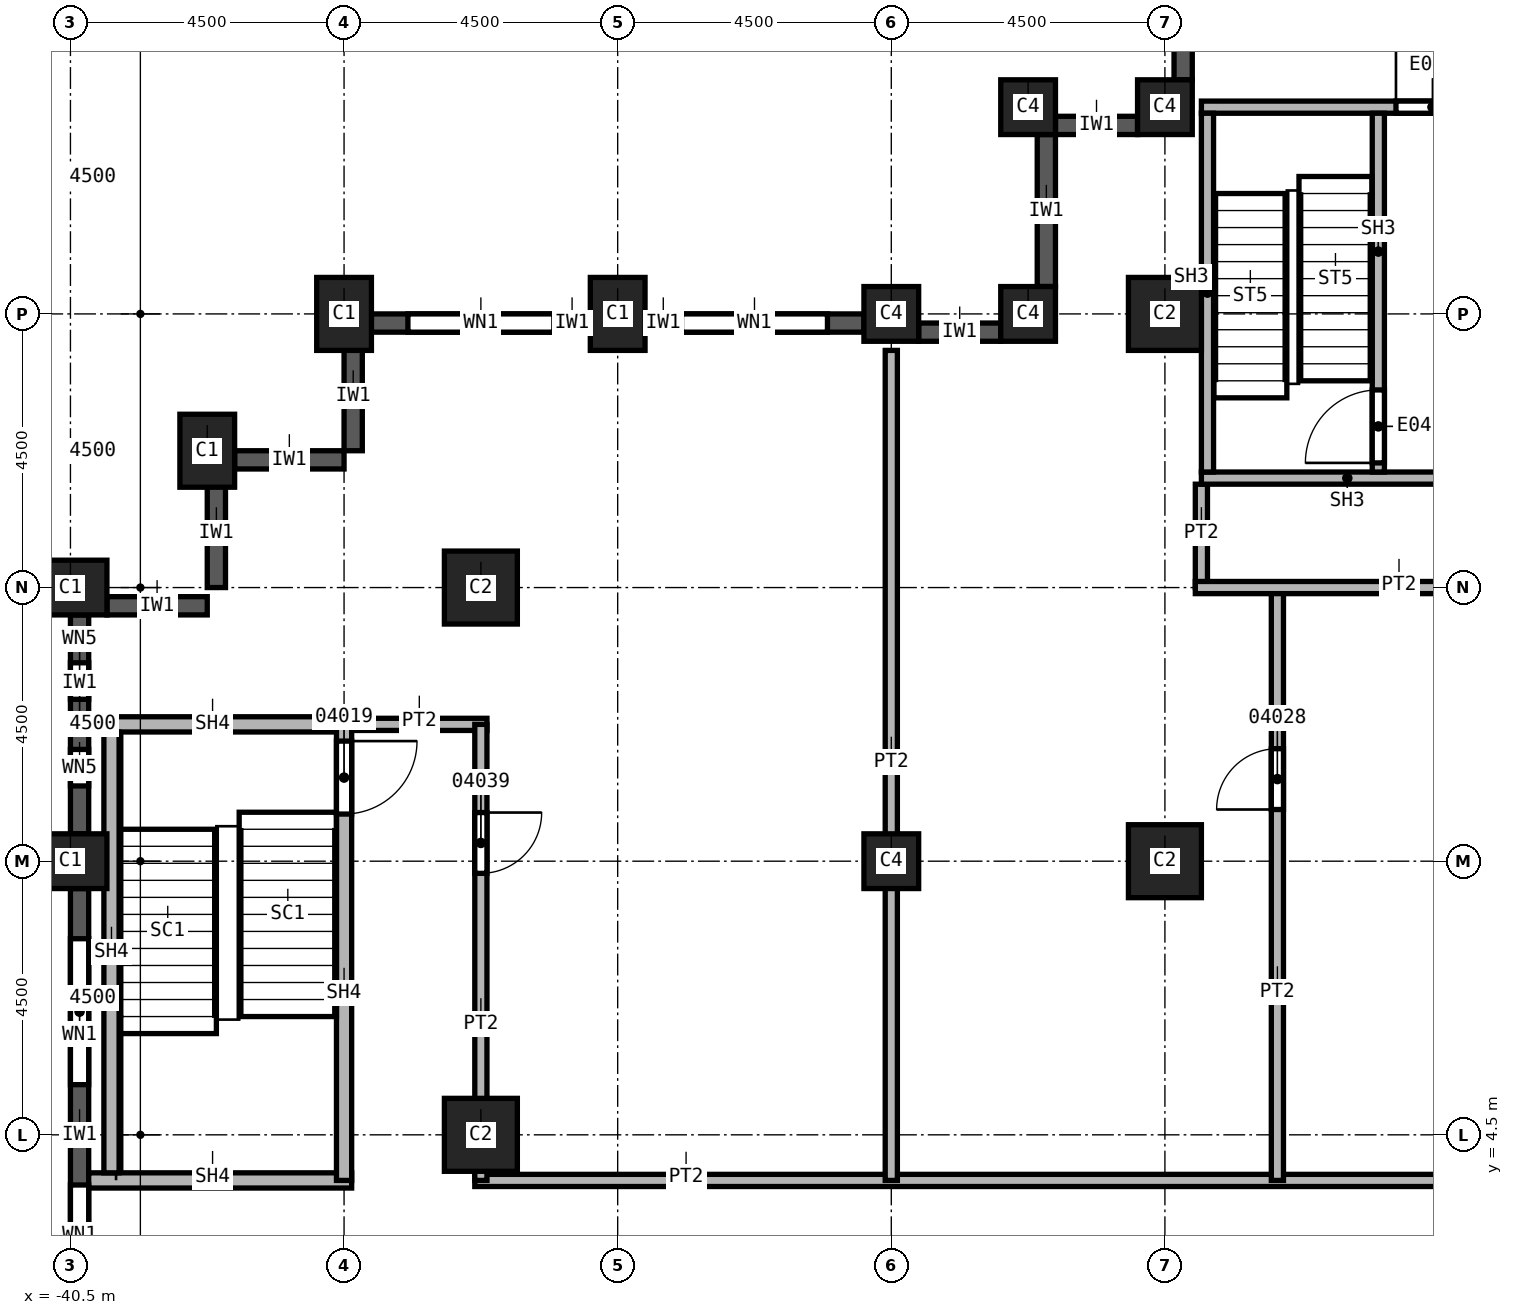
"""IFC4 building model, lengths in metres.
Left out: names, types, materials, properties, quantities, classifications, styles, units other than length and angle.
Written with IfcOpenShell. Run it as: python <this file> out.ifc"""

import sys

from ifc_helpers import new_model, si_unit, direction, frame, frame_2d, origin, origin_2d, place, context, subcontext, project, spatial, rectangle, extrude, element, fill, save


model = new_model("IFC4")
c1 = context("Model", 3, precision=1e-05, world=origin(), true_north=direction((0.0, 1.0)))
c2 = subcontext(c1, "Body", "Model", "MODEL_VIEW")
j1 = project(units=[si_unit("LENGTHUNIT", "METRE"), si_unit("PLANEANGLEUNIT", "RADIAN")], contexts=[c1])
p1 = place(None, origin())
s1 = spatial("IfcSite", under=j1, at=p1, CompositionType="ELEMENT")
p2 = place(p1, origin())
s2 = spatial("IfcBuilding", under=s1, at=p2, CompositionType="ELEMENT")
p3 = place(p2, frame((0.0, 0.0, 108.0)))
s3 = spatial("IfcBuildingStorey", under=s2, at=p3, CompositionType="ELEMENT", Elevation=108.0)
for number, where, z_axis, x_axis in (
    (1, (-40.5, 9.0, 0.0), (0.0, 0.0, 1.0), (0.0, 1.0, 0.0)),
    (2, (-40.5, 13.5, 0.0), (0.0, 0.0, 1.0), (0.0, 1.0, 0.0)),
    (3, (-38.25, 15.75, 0.0), (0.0, 0.0, 1.0), (1.0, 0.0, 0.0)),
    (4, (-31.5, 18.0, 0.0), (0.0, 0.0, 1.0), (1.0, 0.0, 0.0)),
    (5, (-36.0, 18.0, 0.0), (0.0, 0.0, 1.0), (1.0, 0.0, 0.0)),
):
    element("IfcColumn", number, at=place(p3, frame(where, z_axis=z_axis, x_axis=x_axis)), inside=s3, PredefinedType="COLUMN", context=c2, shape_type="SweptSolid", body=[
        extrude(rectangle(XDim=0.9, YDim=1.2, at=origin_2d()), origin(), (0.0, 0.0, 1.0), 3.7),
    ])
for number, where, z_axis, x_axis in (
    (6, (-33.75, 4.5, 0.0), (0.0, 0.0, 1.0), (1.0, 0.0, 0.0)),
    (7, (-33.75, 13.5, 0.0), (0.0, 0.0, 1.0), (1.0, 0.0, 0.0)),
    (8, (-22.5, 9.0, 0.0), (0.0, 0.0, 1.0), (1.0, 0.0, 0.0)),
    (9, (-22.5, 18.0, 0.0), (0.0, 0.0, 1.0), (1.0, 0.0, 0.0)),
):
    element("IfcColumn", number, at=place(p3, frame(where, z_axis=z_axis, x_axis=x_axis)), inside=s3, PredefinedType="COLUMN", context=c2, shape_type="SweptSolid", body=[
        extrude(rectangle(XDim=1.2, YDim=1.2, at=origin_2d()), origin(), (0.0, 0.0, 1.0), 3.7),
    ])
for number, where, z_axis, x_axis in (
    (10, (-27.0, 9.0, 0.0), (0.0, 0.0, 1.0), (1.0, 0.0, 0.0)),
    (11, (-27.0, 18.0, 0.0), (0.0, 0.0, 1.0), (1.0, 0.0, 0.0)),
    (12, (-22.5, 21.4, 0.0), (0.0, 0.0, 1.0), (1.0, 0.0, 0.0)),
    (13, (-24.75, 21.4, 0.0), (0.0, 0.0, 1.0), (1.0, 0.0, 0.0)),
    (14, (-24.75, 18.0, 0.0), (0.0, 0.0, 1.0), (1.0, 0.0, 0.0)),
):
    element("IfcColumn", number, at=place(p3, frame(where, z_axis=z_axis, x_axis=x_axis)), inside=s3, PredefinedType="COLUMN", context=c2, shape_type="SweptSolid", body=[
        extrude(rectangle(XDim=0.9, YDim=0.9, at=origin_2d()), origin(), (0.0, 0.0, 1.0), 3.7),
    ])
for number, where, z_axis, x_axis in (
    (15, (-35.85, 17.55, 0.0), (0.0, 0.0, 1.0), (0.0, -1.0, 0.0)),
    (16, (-37.8, 15.6, 0.0), (0.0, 0.0, 1.0), (1.0, 0.0, 0.0)),
    (17, (-38.1, 15.3, 0.0), (0.0, 0.0, 1.0), (0.0, -1.0, 0.0)),
):
    element("IfcWall", number, at=place(p3, frame(where, z_axis=z_axis, x_axis=x_axis)), inside=s3, PredefinedType="SOLIDWALL", context=c2, shape_type="SweptSolid", body=[
        extrude(rectangle(XDim=1.8, YDim=0.3, at=frame_2d((0.9, 0.0))), origin(), (0.0, 0.0, 1.0), 3.1),
    ])
p4 = place(p3, frame((-39.9, 13.2, 0.0), z_axis=(0.0, 0.0, 1.0), x_axis=(1.0, 0.0, 0.0)))
e18 = element("IfcWall", 18, at=p4, inside=s3, PredefinedType="SOLIDWALL", context=c2, shape_type="SweptSolid", body=[
    extrude(rectangle(XDim=1.65, YDim=0.3, at=frame_2d((0.825, 0.0))), origin(), (0.0, 0.0, 1.0), 3.1),
])
p5 = place(p3, frame((-22.2, 24.2, 0.0), z_axis=(0.0, 0.0, 1.0), x_axis=(0.0, -1.0, 0.0)))
e19 = element("IfcWall", 19, at=p5, inside=s3, PredefinedType="SOLIDWALL", context=c2, shape_type="SweptSolid", body=[
    extrude(rectangle(XDim=2.35, YDim=0.3, at=frame_2d((1.175, 0.0))), origin(), (0.0, 0.0, 1.0), 3.1),
])
p6 = place(p3, frame((-22.95, 21.1, 0.0), z_axis=(0.0, 0.0, 1.0), x_axis=(-1.0, 0.0, 0.0)))
e20 = element("IfcWall", 20, at=p6, inside=s3, PredefinedType="SOLIDWALL", context=c2, shape_type="SweptSolid", body=[
    extrude(rectangle(XDim=1.35, YDim=0.3, at=frame_2d((0.675, 0.0))), origin(), (0.0, 0.0, 1.0), 3.1),
])
p7 = place(p3, frame((-24.45, 20.95, 0.0), z_axis=(0.0, 0.0, 1.0), x_axis=(0.0, -1.0, 0.0)))
e21 = element("IfcWall", 21, at=p7, inside=s3, PredefinedType="SOLIDWALL", context=c2, shape_type="SweptSolid", body=[
    extrude(rectangle(XDim=2.5, YDim=0.3, at=frame_2d((1.25, 0.0))), origin(), (0.0, 0.0, 1.0), 3.1),
])
p8 = place(p3, frame((-25.2, 17.7, 0.0), z_axis=(0.0, 0.0, 1.0), x_axis=(-1.0, 0.0, 0.0)))
e22 = element("IfcWall", 22, at=p8, inside=s3, PredefinedType="SOLIDWALL", context=c2, shape_type="SweptSolid", body=[
    extrude(rectangle(XDim=1.35, YDim=0.3, at=frame_2d((0.675, 0.0))), origin(), (0.0, 0.0, 1.0), 3.1),
])
p9 = place(p3, frame((-27.45, 17.85, 0.0), z_axis=(0.0, 0.0, 1.0), x_axis=(-1.0, 0.0, 0.0)))
e23 = element("IfcWall", 23, at=p9, inside=s3, PredefinedType="SOLIDWALL", context=c2, shape_type="SweptSolid", body=[
    extrude(rectangle(XDim=3.6, YDim=0.3, at=frame_2d((1.8, 0.0))), origin(), (0.0, 0.0, 1.0), 3.1),
])
p10 = place(p9, frame((0.6, 0.0, 0.8)))
e24 = element("IfcOpeningElement", 24, at=p10, cuts=e23, PredefinedType="OPENING", context=c2, shape_type="SweptSolid", body=[
    extrude(rectangle(XDim=2.4, YDim=1.95, at=frame_2d((1.2, 0.975))), frame((0.0, 0.15, 0.0), z_axis=(0.0, -1.0, 0.0), x_axis=(1.0, 0.0, 0.0)), (0.0, 0.0, 1.0), 0.3),
])
p11 = place(p3, frame((-31.95, 17.85, 0.0), z_axis=(0.0, 0.0, 1.0), x_axis=(-1.0, 0.0, 0.0)))
e25 = element("IfcWall", 25, at=p11, inside=s3, PredefinedType="SOLIDWALL", context=c2, shape_type="SweptSolid", body=[
    extrude(rectangle(XDim=3.6, YDim=0.3, at=frame_2d((1.8, 0.0))), origin(), (0.0, 0.0, 1.0), 3.1),
])
p12 = place(p11, frame((0.6, 0.0, 0.8)))
e26 = element("IfcOpeningElement", 26, at=p12, cuts=e25, PredefinedType="OPENING", context=c2, shape_type="SweptSolid", body=[
    extrude(rectangle(XDim=2.4, YDim=1.95, at=frame_2d((1.2, 0.975))), frame((0.0, 0.15, 0.0), z_axis=(0.0, -1.0, 0.0), x_axis=(1.0, 0.0, 0.0)), (0.0, 0.0, 1.0), 0.3),
])
p13 = place(p3, frame((-40.35, 13.05, 0.0), z_axis=(0.0, 0.0, 1.0), x_axis=(0.0, -1.0, 0.0)))
e27 = element("IfcWall", 27, at=p13, inside=s3, PredefinedType="SOLIDWALL", context=c2, shape_type="SweptSolid", body=[
    extrude(rectangle(XDim=3.6, YDim=0.3, at=frame_2d((1.8, 0.0))), origin(), (0.0, 0.0, 1.0), 3.1),
])
p14 = place(p13, frame((0.788, 0.0, 0.8)))
e28 = element("IfcOpeningElement", 28, at=p14, cuts=e27, PredefinedType="OPENING", context=c2, shape_type="SweptSolid", body=[
    extrude(rectangle(XDim=0.6, YDim=1.95, at=frame_2d((0.3, 0.975))), frame((0.0, 0.15, 0.0), z_axis=(0.0, -1.0, 0.0), x_axis=(1.0, 0.0, 0.0)), (0.0, 0.0, 1.0), 0.3),
])
p15 = place(p13, frame((2.212, 0.0, 0.8)))
e29 = element("IfcOpeningElement", 29, at=p15, cuts=e27, PredefinedType="OPENING", context=c2, shape_type="SweptSolid", body=[
    extrude(rectangle(XDim=0.6, YDim=1.95, at=frame_2d((0.3, 0.975))), frame((0.0, 0.15, 0.0), z_axis=(0.0, -1.0, 0.0), x_axis=(1.0, 0.0, 0.0)), (0.0, 0.0, 1.0), 0.3),
])
p16 = place(p3, frame((-40.35, 8.55, 0.0), z_axis=(0.0, 0.0, 1.0), x_axis=(0.0, -1.0, 0.0)))
e30 = element("IfcWall", 30, at=p16, inside=s3, PredefinedType="SOLIDWALL", context=c2, shape_type="SweptSolid", body=[
    extrude(rectangle(XDim=8.1, YDim=0.3, at=frame_2d((4.05, 0.0))), origin(), (0.0, 0.0, 1.0), 3.1),
])
p17 = place(p16, frame((0.825, 0.0, 0.8)))
e31 = element("IfcOpeningElement", 31, at=p17, cuts=e30, PredefinedType="OPENING", context=c2, shape_type="SweptSolid", body=[
    extrude(rectangle(XDim=2.4, YDim=1.95, at=frame_2d((1.2, 0.975))), frame((0.0, 0.15, 0.0), z_axis=(0.0, -1.0, 0.0), x_axis=(1.0, 0.0, 0.0)), (0.0, 0.0, 1.0), 0.3),
])
p18 = place(p16, frame((4.875, 0.0, 0.8)))
e32 = element("IfcOpeningElement", 32, at=p18, cuts=e30, PredefinedType="OPENING", context=c2, shape_type="SweptSolid", body=[
    extrude(rectangle(XDim=2.4, YDim=1.95, at=frame_2d((1.2, 0.975))), frame((0.0, 0.15, 0.0), z_axis=(0.0, -1.0, 0.0), x_axis=(1.0, 0.0, 0.0)), (0.0, 0.0, 1.0), 0.3),
])
p19 = place(p3, frame((-36.0, 11.25, 0.0), z_axis=(0.0, 0.0, 1.0), x_axis=(1.0, 0.0, 0.0)))
e33 = element("IfcWall", 33, at=p19, inside=s3, PredefinedType="PARTITIONING", context=c2, shape_type="SweptSolid", body=[
    extrude(rectangle(XDim=2.35, YDim=0.2, at=frame_2d((1.175, 0.0))), origin(), (0.0, 0.0, 1.0), 3.7),
])
p20 = place(p3, frame((-33.85, 3.75, 0.0), z_axis=(0.0, 0.0, 1.0), x_axis=(1.0, 0.0, 0.0)))
e34 = element("IfcWall", 34, at=p20, inside=s3, PredefinedType="PARTITIONING", context=c2, shape_type="SweptSolid", body=[
    extrude(rectangle(XDim=18.45, YDim=0.2, at=frame_2d((9.225, 0.0))), origin(), (0.0, 0.0, 1.0), 3.7),
])
p21 = place(p3, frame((-33.75, 11.25, 0.0), z_axis=(0.0, 0.0, 1.0), x_axis=(0.0, -1.0, 0.0)))
e35 = element("IfcWall", 35, at=p21, inside=s3, PredefinedType="PARTITIONING", context=c2, shape_type="SweptSolid", body=[
    extrude(rectangle(XDim=7.5, YDim=0.2, at=frame_2d((3.75, 0.0))), origin(), (0.0, 0.0, 1.0), 3.7),
])
p22 = place(p21, frame((1.45, 0.0, 0.0)))
e36 = element("IfcOpeningElement", 36, at=p22, cuts=e35, PredefinedType="OPENING", context=c2, shape_type="SweptSolid", body=[
    extrude(rectangle(XDim=1.0, YDim=2.1, at=frame_2d((0.5, 1.05))), frame((0.0, 0.1, 0.0), z_axis=(0.0, -1.0, 0.0), x_axis=(1.0, 0.0, 0.0)), (0.0, 0.0, 1.0), 0.2),
])
p23 = place(p3, frame((-27.0, 3.75, 0.0), z_axis=(0.0, 0.0, 1.0), x_axis=(0.0, 1.0, 0.0)))
e37 = element("IfcWall", 37, at=p23, inside=s3, PredefinedType="PARTITIONING", context=c2, shape_type="SweptSolid", body=[
    extrude(rectangle(XDim=13.65, YDim=0.2, at=frame_2d((6.825, 0.0))), origin(), (0.0, 0.0, 1.0), 3.7),
])
p24 = place(p3, frame((-21.9, 13.5, 0.0), z_axis=(0.0, 0.0, 1.0), x_axis=(0.0, 1.0, 0.0)))
e38 = element("IfcWall", 38, at=p24, inside=s3, PredefinedType="PARTITIONING", context=c2, shape_type="SweptSolid", body=[
    extrude(rectangle(XDim=1.7, YDim=0.2, at=frame_2d((0.85, 0.0))), origin(), (0.0, 0.0, 1.0), 3.7),
])
p25 = place(p3, frame((-20.65, 3.75, 0.0), z_axis=(0.0, 0.0, 1.0), x_axis=(0.0, 1.0, 0.0)))
e39 = element("IfcWall", 39, at=p25, inside=s3, PredefinedType="PARTITIONING", context=c2, shape_type="SweptSolid", body=[
    extrude(rectangle(XDim=9.75, YDim=0.2, at=frame_2d((4.875, 0.0))), origin(), (0.0, 0.0, 1.0), 3.7),
])
p26 = place(p25, frame((6.1, 0.0, 0.0)))
e40 = element("IfcOpeningElement", 40, at=p26, cuts=e39, PredefinedType="OPENING", context=c2, shape_type="SweptSolid", body=[
    extrude(rectangle(XDim=1.0, YDim=2.1, at=frame_2d((0.5, 1.05))), frame((0.0, 0.1, 0.0), z_axis=(0.0, -1.0, 0.0), x_axis=(1.0, 0.0, 0.0)), (0.0, 0.0, 1.0), 0.2),
])
p27 = place(p3, frame((-15.4, 13.5, 0.0), z_axis=(0.0, 0.0, 1.0), x_axis=(-1.0, 0.0, 0.0)))
e41 = element("IfcWall", 41, at=p27, inside=s3, PredefinedType="PARTITIONING", context=c2, shape_type="SweptSolid", body=[
    extrude(rectangle(XDim=6.6, YDim=0.2, at=frame_2d((3.3, 0.0))), origin(), (0.0, 0.0, 1.0), 3.7),
])
p28 = place(p3, frame((-40.2, 3.75, 0.0), z_axis=(0.0, 0.0, 1.0), x_axis=(1.0, 0.0, 0.0)))
e42 = element("IfcWall", 42, at=p28, inside=s3, PredefinedType="SOLIDWALL", context=c2, shape_type="SweptSolid", body=[
    extrude(rectangle(XDim=4.325, YDim=0.25, at=frame_2d((2.163, 0.0))), origin(), (0.0, 0.0, 1.0), 3.7),
])
p29 = place(p3, frame((-40.2, 11.25, 0.0), z_axis=(0.0, 0.0, 1.0), x_axis=(1.0, 0.0, 0.0)))
e43 = element("IfcWall", 43, at=p29, inside=s3, PredefinedType="SOLIDWALL", context=c2, shape_type="SweptSolid", body=[
    extrude(rectangle(XDim=4.2, YDim=0.25, at=frame_2d((2.1, 0.0))), origin(), (0.0, 0.0, 1.0), 3.7),
])
p30 = place(p3, frame((-36.0, 11.375, 0.0), z_axis=(0.0, 0.0, 1.0), x_axis=(0.0, -1.0, 0.0)))
e44 = element("IfcWall", 44, at=p30, inside=s3, PredefinedType="SOLIDWALL", context=c2, shape_type="SweptSolid", body=[
    extrude(rectangle(XDim=7.625, YDim=0.25, at=frame_2d((3.812, 0.0))), origin(), (0.0, 0.0, 1.0), 3.7),
])
p31 = place(p30, frame((0.4, 0.0, 0.0)))
e45 = element("IfcOpeningElement", 45, at=p31, cuts=e44, PredefinedType="OPENING", context=c2, shape_type="SweptSolid", body=[
    extrude(rectangle(XDim=1.2, YDim=2.1, at=frame_2d((0.6, 1.05))), frame((0.0, 0.125, 0.0), z_axis=(0.0, -1.0, 0.0), x_axis=(1.0, 0.0, 0.0)), (0.0, 0.0, 1.0), 0.25),
])
p32 = place(p3, frame((-21.9, 15.3, 0.0), z_axis=(0.0, 0.0, 1.0), x_axis=(1.0, 0.0, 0.0)))
e46 = element("IfcWall", 46, at=p32, inside=s3, PredefinedType="SOLIDWALL", context=c2, shape_type="SweptSolid", body=[
    extrude(rectangle(XDim=8.275, YDim=0.2, at=frame_2d((4.137, 0.0))), origin(), (0.0, 0.0, 1.0), 3.7),
])
p33 = place(p32, frame((4.8, 0.0, 0.0)))
e47 = element("IfcOpeningElement", 47, at=p33, cuts=e46, PredefinedType="OPENING", context=c2, shape_type="SweptSolid", body=[
    extrude(rectangle(XDim=1.2, YDim=2.1, at=frame_2d((0.6, 1.05))), frame((0.0, 0.1, 0.0), z_axis=(0.0, -1.0, 0.0), x_axis=(1.0, 0.0, 0.0)), (0.0, 0.0, 1.0), 0.2),
])
p34 = place(p3, frame((-21.9, 21.4, 0.0), z_axis=(0.0, 0.0, 1.0), x_axis=(1.0, 0.0, 0.0)))
e48 = element("IfcWall", 48, at=p34, inside=s3, PredefinedType="SOLIDWALL", context=c2, shape_type="SweptSolid", body=[
    extrude(rectangle(XDim=7.8, YDim=0.2, at=frame_2d((3.9, 0.0))), origin(), (0.0, 0.0, 1.0), 3.7),
])
p35 = place(p34, frame((3.2, 0.0, 0.0)))
e49 = element("IfcOpeningElement", 49, at=p35, cuts=e48, PredefinedType="OPENING", context=c2, shape_type="SweptSolid", body=[
    extrude(rectangle(XDim=1.2, YDim=2.1, at=frame_2d((0.6, 1.05))), frame((0.0, 0.1, 0.0), z_axis=(0.0, -1.0, 0.0), x_axis=(1.0, 0.0, 0.0)), (0.0, 0.0, 1.0), 0.2),
])
p36 = place(p3, frame((-21.8, 15.4, 0.0), z_axis=(0.0, 0.0, 1.0), x_axis=(0.0, 1.0, 0.0)))
e50 = element("IfcWall", 50, at=p36, inside=s3, PredefinedType="SOLIDWALL", context=c2, shape_type="SweptSolid", body=[
    extrude(rectangle(XDim=5.9, YDim=0.2, at=frame_2d((2.95, 0.0))), origin(), (0.0, 0.0, 1.0), 3.7),
])
p37 = place(p3, frame((-18.99, 15.4, 0.0), z_axis=(0.0, 0.0, 1.0), x_axis=(0.0, 1.0, 0.0)))
e51 = element("IfcWall", 51, at=p37, inside=s3, PredefinedType="SOLIDWALL", context=c2, shape_type="SweptSolid", body=[
    extrude(rectangle(XDim=5.9, YDim=0.2, at=frame_2d((2.95, 0.0))), origin(), (0.0, 0.0, 1.0), 3.7),
])
p38 = place(p37, frame((0.15, 0.0, 0.0)))
e52 = element("IfcOpeningElement", 52, at=p38, cuts=e51, PredefinedType="OPENING", context=c2, shape_type="SweptSolid", body=[
    extrude(rectangle(XDim=1.2, YDim=2.1, at=frame_2d((0.6, 1.05))), frame((0.0, 0.1, 0.0), z_axis=(0.0, -1.0, 0.0), x_axis=(1.0, 0.0, 0.0)), (0.0, 0.0, 1.0), 0.2),
])
p39 = place(p3, frame((-39.825, 3.875, 0.0), z_axis=(0.0, 0.0, 1.0), x_axis=(0.0, 1.0, 0.0)))
e53 = element("IfcWall", 53, at=p39, inside=s3, PredefinedType="SOLIDWALL", context=c2, shape_type="SweptSolid", body=[
    extrude(rectangle(XDim=7.25, YDim=0.25, at=frame_2d((3.625, 0.0))), origin(), (0.0, 0.0, 1.0), 3.7),
])
p40 = place(p10, origin())
e54 = element("IfcWindow", 54, at=p40, inside=s3, PartitioningType="SINGLE_PANEL", PredefinedType="WINDOW", context=c2, shape_type="SweptSolid", body=[
    extrude(rectangle(XDim=2.4, YDim=1.95, at=frame_2d((1.2, 0.975))), frame((0.0, 0.03, 0.0), z_axis=(0.0, -1.0, 0.0), x_axis=(1.0, 0.0, 0.0)), (0.0, 0.0, 1.0), 0.06),
])
fill(e24, e54)
p41 = place(p12, origin())
e55 = element("IfcWindow", 55, at=p41, inside=s3, PartitioningType="SINGLE_PANEL", PredefinedType="WINDOW", context=c2, shape_type="SweptSolid", body=[
    extrude(rectangle(XDim=2.4, YDim=1.95, at=frame_2d((1.2, 0.975))), frame((0.0, 0.03, 0.0), z_axis=(0.0, -1.0, 0.0), x_axis=(1.0, 0.0, 0.0)), (0.0, 0.0, 1.0), 0.06),
])
fill(e26, e55)
p42 = place(p17, origin())
e56 = element("IfcWindow", 56, at=p42, inside=s3, PartitioningType="SINGLE_PANEL", PredefinedType="WINDOW", context=c2, shape_type="SweptSolid", body=[
    extrude(rectangle(XDim=2.4, YDim=1.95, at=frame_2d((1.2, 0.975))), frame((0.0, 0.03, 0.0), z_axis=(0.0, -1.0, 0.0), x_axis=(1.0, 0.0, 0.0)), (0.0, 0.0, 1.0), 0.06),
])
fill(e31, e56)
p43 = place(p18, origin())
e57 = element("IfcWindow", 57, at=p43, inside=s3, PartitioningType="SINGLE_PANEL", PredefinedType="WINDOW", context=c2, shape_type="SweptSolid", body=[
    extrude(rectangle(XDim=2.4, YDim=1.95, at=frame_2d((1.2, 0.975))), frame((0.0, 0.03, 0.0), z_axis=(0.0, -1.0, 0.0), x_axis=(1.0, 0.0, 0.0)), (0.0, 0.0, 1.0), 0.06),
])
fill(e32, e57)
p44 = place(p31, origin())
e58 = element("IfcDoor", 58, at=p44, inside=s3, OperationType="SINGLE_SWING_RIGHT", PredefinedType="DOOR", context=c2, shape_type="SweptSolid", body=[
    extrude(rectangle(XDim=1.2, YDim=2.1, at=frame_2d((0.6, 1.05))), frame((0.0, 0.025, 0.0), z_axis=(0.0, -1.0, 0.0), x_axis=(1.0, 0.0, 0.0)), (0.0, 0.0, 1.0), 0.05),
])
fill(e45, e58)
p45 = place(p26, origin())
e59 = element("IfcDoor", 59, at=p45, inside=s3, OperationType="SINGLE_SWING_LEFT", PredefinedType="DOOR", context=c2, shape_type="SweptSolid", body=[
    extrude(rectangle(XDim=1.0, YDim=2.1, at=frame_2d((0.5, 1.05))), frame((0.0, 0.025, 0.0), z_axis=(0.0, -1.0, 0.0), x_axis=(1.0, 0.0, 0.0)), (0.0, 0.0, 1.0), 0.05),
])
fill(e40, e59)
p46 = place(p22, origin())
e60 = element("IfcDoor", 60, at=p46, inside=s3, OperationType="SINGLE_SWING_RIGHT", PredefinedType="DOOR", context=c2, shape_type="SweptSolid", body=[
    extrude(rectangle(XDim=1.0, YDim=2.1, at=frame_2d((0.5, 1.05))), frame((0.0, 0.025, 0.0), z_axis=(0.0, -1.0, 0.0), x_axis=(1.0, 0.0, 0.0)), (0.0, 0.0, 1.0), 0.05),
])
fill(e36, e60)
p47 = place(p38, origin())
e61 = element("IfcDoor", 61, at=p47, inside=s3, OperationType="SINGLE_SWING_LEFT", PredefinedType="DOOR", context=c2, shape_type="SweptSolid", body=[
    extrude(rectangle(XDim=1.2, YDim=2.1, at=frame_2d((0.6, 1.05))), frame((0.0, 0.025, 0.0), z_axis=(0.0, -1.0, 0.0), x_axis=(1.0, 0.0, 0.0)), (0.0, 0.0, 1.0), 0.05),
])
fill(e52, e61)
p48 = place(p35, origin())
e62 = element("IfcDoor", 62, at=p48, inside=s3, OperationType="SINGLE_SWING_LEFT", PredefinedType="DOOR", context=c2, shape_type="SweptSolid", body=[
    extrude(rectangle(XDim=1.2, YDim=2.1, at=frame_2d((0.6, 1.05))), frame((0.0, 0.025, 0.0), z_axis=(0.0, -1.0, 0.0), x_axis=(1.0, 0.0, 0.0)), (0.0, 0.0, 1.0), 0.05),
])
fill(e49, e62)
p49 = place(p14, origin())
e63 = element("IfcWindow", 63, at=p49, inside=s3, PartitioningType="SINGLE_PANEL", PredefinedType="WINDOW", context=c2, shape_type="SweptSolid", body=[
    extrude(rectangle(XDim=0.6, YDim=1.95, at=frame_2d((0.3, 0.975))), frame((0.0, 0.03, 0.0), z_axis=(0.0, -1.0, 0.0), x_axis=(1.0, 0.0, 0.0)), (0.0, 0.0, 1.0), 0.06),
])
fill(e28, e63)
p50 = place(p15, origin())
e64 = element("IfcWindow", 64, at=p50, inside=s3, PartitioningType="SINGLE_PANEL", PredefinedType="WINDOW", context=c2, shape_type="SweptSolid", body=[
    extrude(rectangle(XDim=0.6, YDim=1.95, at=frame_2d((0.3, 0.975))), frame((0.0, 0.03, 0.0), z_axis=(0.0, -1.0, 0.0), x_axis=(1.0, 0.0, 0.0)), (0.0, 0.0, 1.0), 0.06),
])
fill(e29, e64)
save(model, sys.argv[1])
